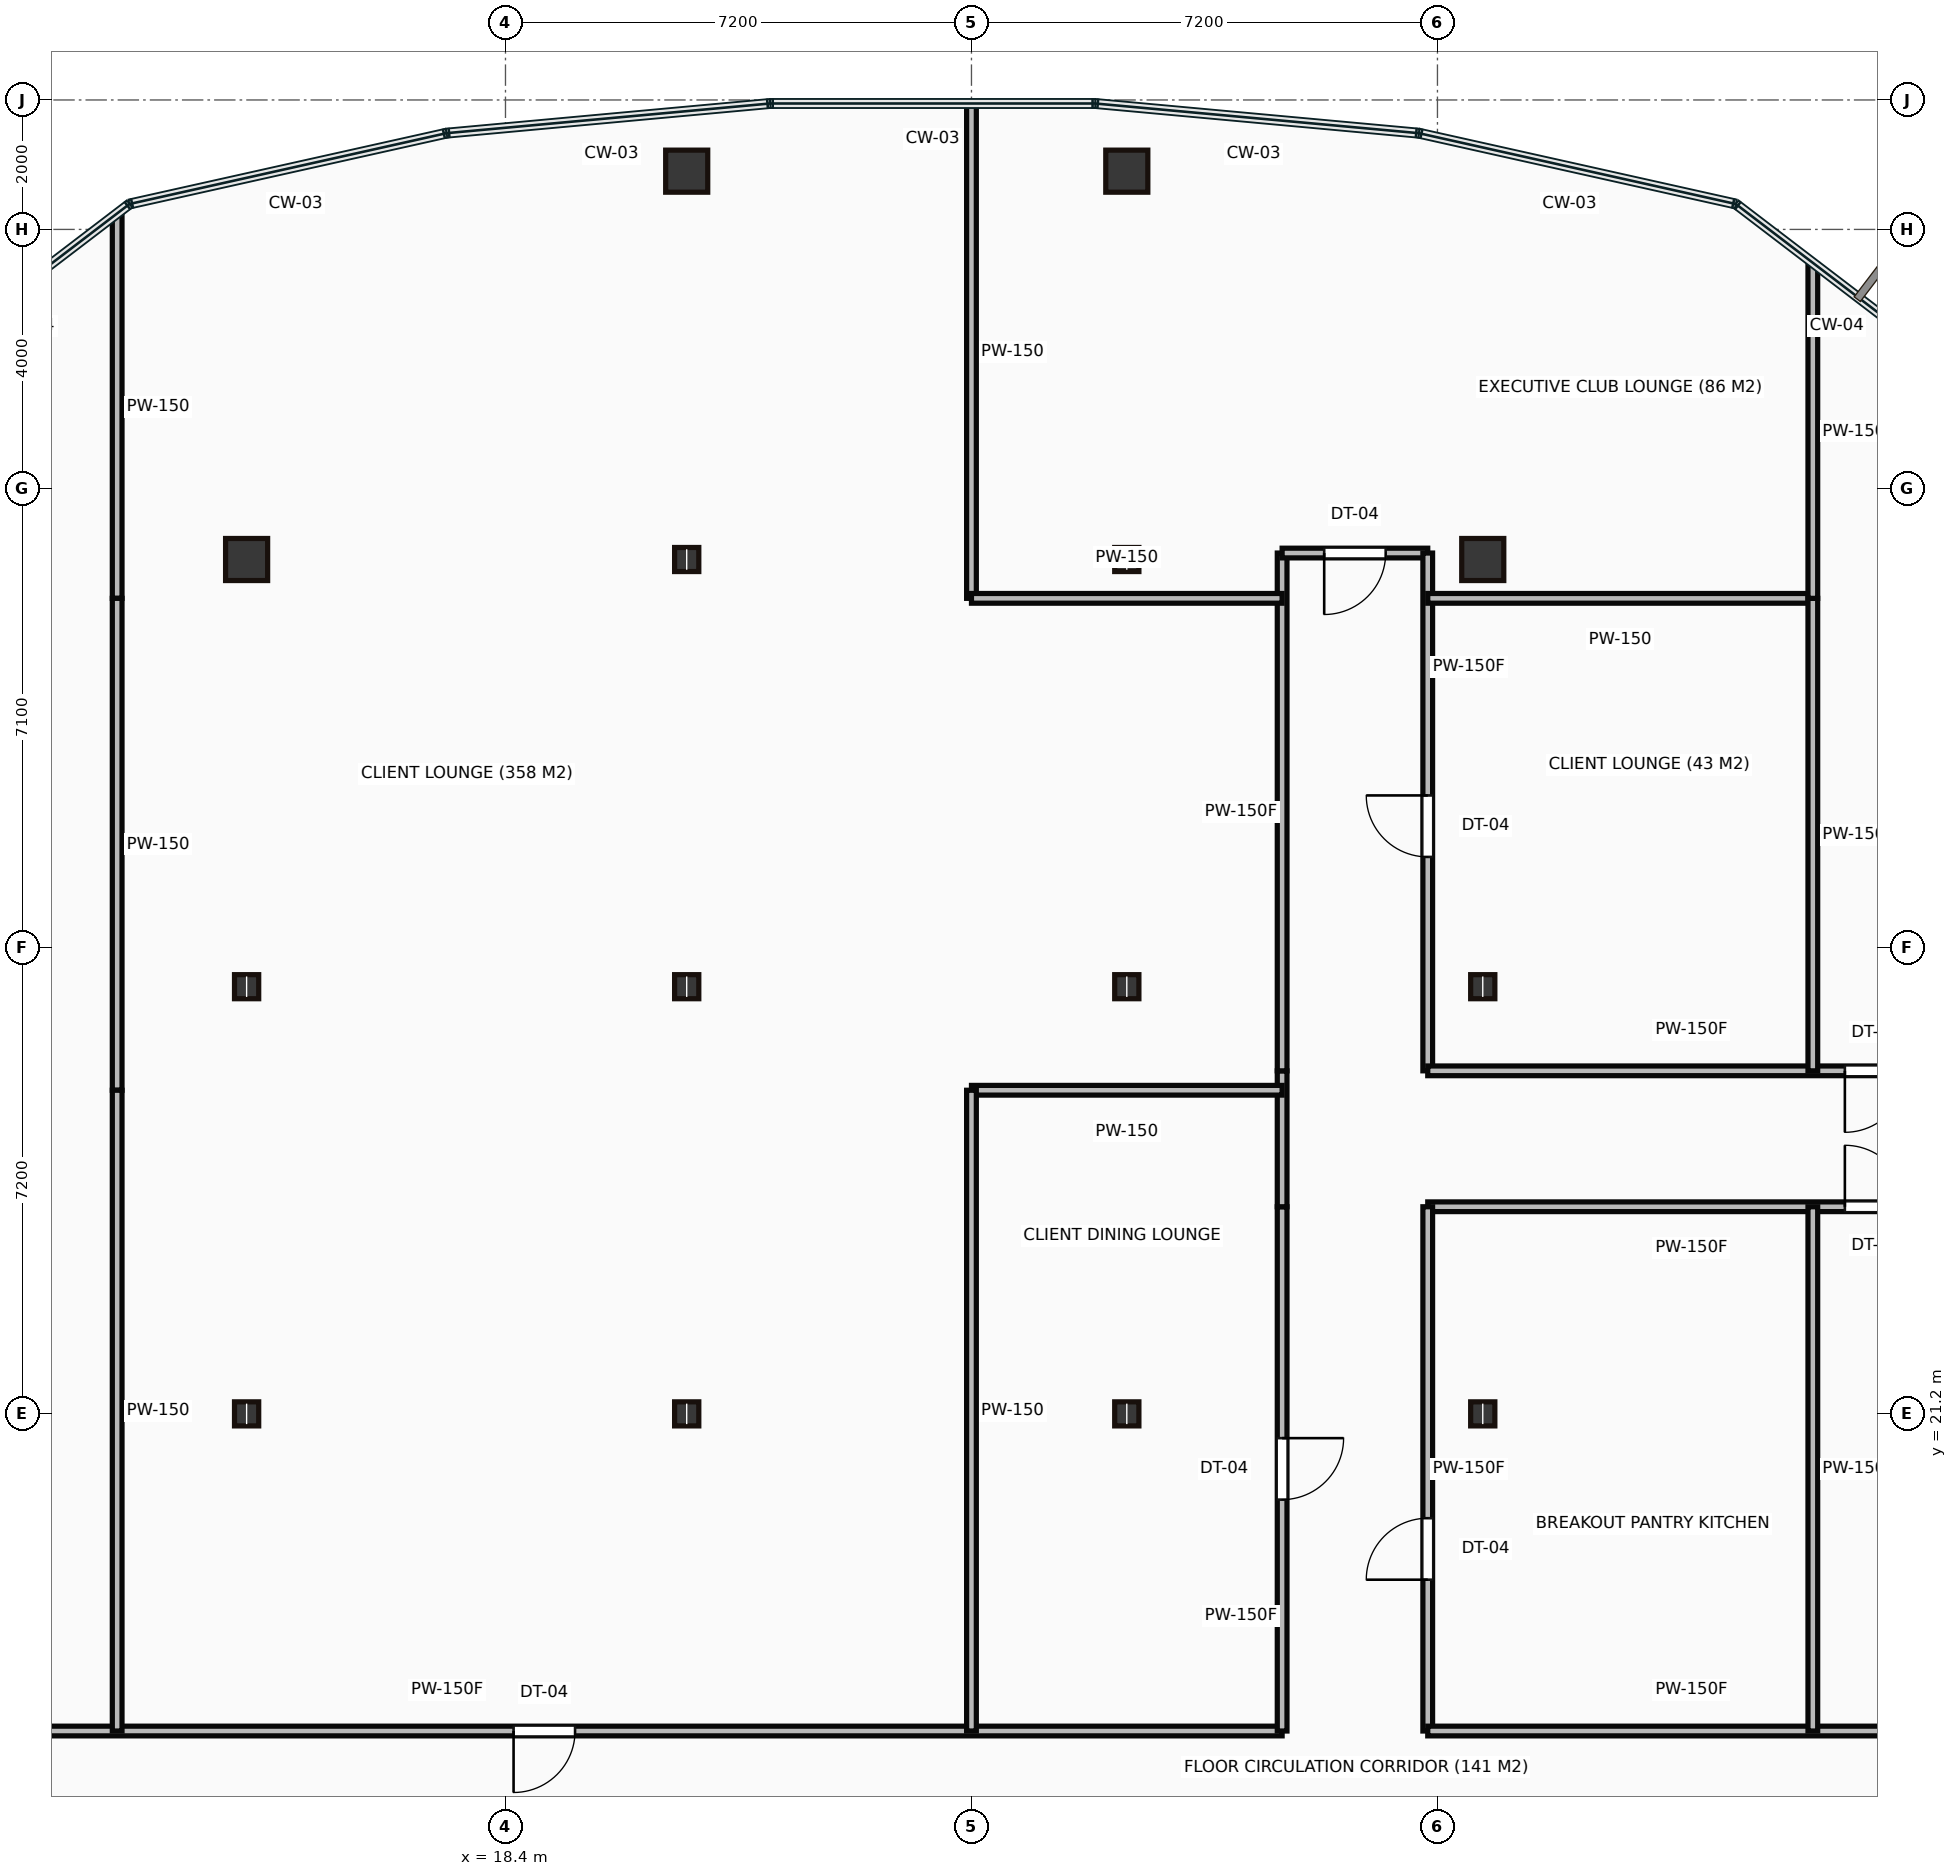
"""IFC4 building model, lengths in metres.
Left out: names, types, materials, properties, quantities, classifications, styles, units other than length and angle.
Written with IfcOpenShell. Run it as: python <this file> out.ifc"""

import sys

from ifc_helpers import new_model, si_unit, direction, frame, frame_2d, origin, origin_2d, place, context, subcontext, project, spatial, rectangle, hollow_rectangle, i_section, extrude, source, transform, mapped, element, fill, save


model = new_model("IFC4")
c1 = context("Model", 3, precision=1e-05, world=origin(), true_north=direction((0.0, 1.0)))
c2 = subcontext(c1, "Body", "Model", "MODEL_VIEW")
j1 = project(units=[si_unit("LENGTHUNIT", "METRE"), si_unit("PLANEANGLEUNIT", "RADIAN")], contexts=[c1])
p1 = place(None, origin())
s1 = spatial("IfcSite", under=j1, at=p1, CompositionType="ELEMENT")
p2 = place(p1, origin())
s2 = spatial("IfcBuilding", under=s1, at=p2, CompositionType="ELEMENT")
p3 = place(p2, frame((0.0, 0.0, 166.15)))
s3 = spatial("IfcBuildingStorey", under=s2, at=p3, CompositionType="ELEMENT", Elevation=166.15)
m1 = source(origin(), c2, "Body", "SweptSolid", [
    extrude(i_section(OverallWidth=0.374, OverallDepth=0.372, WebThickness=0.016, FlangeThickness=0.026, at=origin_2d()), origin(), (0.0, 0.0, 1.0), 3.65),
])
for number, where, z_axis, x_axis in (
    (1, (14.4, 21.2, 0.0), (0.0, 0.0, 1.0), (1.0, 0.0, 0.0)),
    (2, (14.4, 27.8, 0.0), (0.0, 0.0, 1.0), (1.0, 0.0, 0.0)),
):
    element("IfcColumn", number, at=place(p3, frame(where, z_axis=z_axis, x_axis=x_axis)), inside=s3, PredefinedType="COLUMN", context=c2, shape_type="MappedRepresentation", body=[
        mapped(m1, transform((0.0, 0.0, 0.0))),
    ])
m2 = source(origin(), c2, "Body", "SweptSolid", [
    extrude(hollow_rectangle(XDim=0.65, YDim=0.65, WallThickness=0.032, at=origin_2d()), origin(), (0.0, 0.0, 1.0), 3.65),
])
p4 = place(p3, frame((14.4, 34.4, 0.0), z_axis=(0.0, 0.0, 1.0), x_axis=(1.0, 0.0, 0.0)))
e3 = element("IfcColumn", 3, at=p4, inside=s3, PredefinedType="COLUMN", context=c2, shape_type="MappedRepresentation", body=[
    mapped(m2, transform((0.0, 0.0, 0.0))),
])
for number, where, z_axis, x_axis in (
    (4, (21.2, 21.2, 0.0), (0.0, 0.0, 1.0), (1.0, 0.0, 0.0)),
    (5, (21.2, 27.8, 0.0), (0.0, 0.0, 1.0), (1.0, 0.0, 0.0)),
    (6, (21.2, 34.4, 0.0), (0.0, 0.0, 1.0), (1.0, 0.0, 0.0)),
):
    element("IfcColumn", number, at=place(p3, frame(where, z_axis=z_axis, x_axis=x_axis)), inside=s3, PredefinedType="COLUMN", context=c2, shape_type="MappedRepresentation", body=[
        mapped(m1, transform((0.0, 0.0, 0.0))),
    ])
p5 = place(p3, frame((21.2, 40.4, 0.0), z_axis=(0.0, 0.0, 1.0), x_axis=(1.0, 0.0, 0.0)))
e7 = element("IfcColumn", 7, at=p5, inside=s3, PredefinedType="COLUMN", context=c2, shape_type="MappedRepresentation", body=[
    mapped(m2, transform((0.0, 0.0, 0.0))),
])
for number, where, z_axis, x_axis in (
    (8, (28.0, 21.2, 0.0), (0.0, 0.0, 1.0), (1.0, 0.0, 0.0)),
    (9, (28.0, 27.8, 0.0), (0.0, 0.0, 1.0), (1.0, 0.0, 0.0)),
    (10, (28.0, 34.4, 0.0), (0.0, 0.0, 1.0), (1.0, 0.0, 0.0)),
):
    element("IfcColumn", number, at=place(p3, frame(where, z_axis=z_axis, x_axis=x_axis)), inside=s3, PredefinedType="COLUMN", context=c2, shape_type="MappedRepresentation", body=[
        mapped(m1, transform((0.0, 0.0, 0.0))),
    ])
p6 = place(p3, frame((28.0, 40.4, 0.0), z_axis=(0.0, 0.0, 1.0), x_axis=(1.0, 0.0, 0.0)))
e11 = element("IfcColumn", 11, at=p6, inside=s3, PredefinedType="COLUMN", context=c2, shape_type="MappedRepresentation", body=[
    mapped(m2, transform((0.0, 0.0, 0.0))),
])
for number, where, z_axis, x_axis in (
    (12, (33.5, 21.2, 0.0), (0.0, 0.0, 1.0), (1.0, 0.0, 0.0)),
    (13, (33.5, 27.8, 0.0), (0.0, 0.0, 1.0), (1.0, 0.0, 0.0)),
):
    element("IfcColumn", number, at=place(p3, frame(where, z_axis=z_axis, x_axis=x_axis)), inside=s3, PredefinedType="COLUMN", context=c2, shape_type="MappedRepresentation", body=[
        mapped(m1, transform((0.0, 0.0, 0.0))),
    ])
p7 = place(p3, frame((33.5, 34.4, 0.0), z_axis=(0.0, 0.0, 1.0), x_axis=(1.0, 0.0, 0.0)))
e14 = element("IfcColumn", 14, at=p7, inside=s3, PredefinedType="COLUMN", context=c2, shape_type="MappedRepresentation", body=[
    mapped(m2, transform((0.0, 0.0, 0.0))),
])
m3 = source(origin(), c2, "Body", "SweptSolid", [
    extrude(rectangle(XDim=25.8, YDim=0.15, at=frame_2d((12.9, 0.0))), origin(), (0.0, 0.0, 1.0), 3.4),
])
p8 = place(p3, frame((4.6, 16.3, 0.0), z_axis=(0.0, 0.0, 1.0), x_axis=(1.0, 0.0, 0.0)))
e15 = element("IfcWall", 15, at=p8, inside=s3, PredefinedType="PARTITIONING", context=c2, shape_type="MappedRepresentation", body=[
    mapped(m3, transform((0.0, 0.0, 0.0))),
])
p9 = place(p8, frame((3.555, 0.0, 0.0)))
e16 = element("IfcOpeningElement", 16, at=p9, cuts=e15, PredefinedType="OPENING", context=c2, shape_type="SweptSolid", body=[
    extrude(rectangle(XDim=0.95, YDim=2.15, at=frame_2d((0.475, 1.075))), frame((0.0, 0.085, 0.0), z_axis=(0.0, -1.0, 0.0), x_axis=(1.0, 0.0, 0.0)), (0.0, 0.0, 1.0), 0.17),
])
p10 = place(p8, frame((13.925, 0.0, 0.0)))
e17 = element("IfcOpeningElement", 17, at=p10, cuts=e15, PredefinedType="OPENING", context=c2, shape_type="SweptSolid", body=[
    extrude(rectangle(XDim=0.95, YDim=2.15, at=frame_2d((0.475, 1.075))), frame((0.0, 0.085, 0.0), z_axis=(0.0, -1.0, 0.0), x_axis=(1.0, 0.0, 0.0)), (0.0, 0.0, 1.0), 0.17),
])
m4 = source(origin(), c2, "Body", "SweptSolid", [
    extrude(rectangle(XDim=8.1, YDim=0.15, at=frame_2d((4.05, 0.0))), origin(), (0.0, 0.0, 1.0), 3.4),
])
p11 = place(p3, frame((30.4, 16.3, 0.0), z_axis=(0.0, 0.0, 1.0), x_axis=(0.0, 1.0, 0.0)))
e18 = element("IfcWall", 18, at=p11, inside=s3, PredefinedType="PARTITIONING", context=c2, shape_type="MappedRepresentation", body=[
    mapped(m4, transform((0.0, 0.0, 0.0))),
])
p12 = place(p11, frame((3.575, 0.0, 0.0)))
e19 = element("IfcOpeningElement", 19, at=p12, cuts=e18, PredefinedType="OPENING", context=c2, shape_type="SweptSolid", body=[
    extrude(rectangle(XDim=0.95, YDim=2.15, at=frame_2d((0.475, 1.075))), frame((0.0, 0.085, 0.0), z_axis=(0.0, -1.0, 0.0), x_axis=(1.0, 0.0, 0.0)), (0.0, 0.0, 1.0), 0.17),
])
m5 = source(origin(), c2, "Body", "SweptSolid", [
    extrude(rectangle(XDim=2.1, YDim=0.15, at=frame_2d((1.05, 0.0))), origin(), (0.0, 0.0, 1.0), 3.4),
])
p13 = place(p3, frame((30.4, 24.4, 0.0), z_axis=(0.0, 0.0, 1.0), x_axis=(0.0, 1.0, 0.0)))
e20 = element("IfcWall", 20, at=p13, inside=s3, PredefinedType="PARTITIONING", context=c2, shape_type="MappedRepresentation", body=[
    mapped(m5, transform((0.0, 0.0, 0.0))),
])
m6 = source(origin(), c2, "Body", "SweptSolid", [
    extrude(rectangle(XDim=8.0, YDim=0.15, at=frame_2d((4.0, 0.0))), origin(), (0.0, 0.0, 1.0), 3.4),
])
p14 = place(p3, frame((30.4, 26.5, 0.0), z_axis=(0.0, 0.0, 1.0), x_axis=(0.0, 1.0, 0.0)))
e21 = element("IfcWall", 21, at=p14, inside=s3, PredefinedType="PARTITIONING", context=c2, shape_type="MappedRepresentation", body=[
    mapped(m6, transform((0.0, 0.0, 0.0))),
])
m7 = source(origin(), c2, "Body", "SweptSolid", [
    extrude(rectangle(XDim=2.25, YDim=0.15, at=frame_2d((1.125, 0.0))), origin(), (0.0, 0.0, 1.0), 2.76),
])
p15 = place(p3, frame((30.4, 34.5, 0.0), z_axis=(0.0, 0.0, 1.0), x_axis=(1.0, 0.0, 0.0)))
e22 = element("IfcWall", 22, at=p15, inside=s3, PredefinedType="PARTITIONING", context=c2, shape_type="MappedRepresentation", body=[
    mapped(m7, transform((0.0, 0.0, 0.0))),
])
p16 = place(p15, frame((0.65, 0.0, 0.0)))
e23 = element("IfcOpeningElement", 23, at=p16, cuts=e22, PredefinedType="OPENING", context=c2, shape_type="SweptSolid", body=[
    extrude(rectangle(XDim=0.95, YDim=2.15, at=frame_2d((0.475, 1.075))), frame((0.0, 0.085, 0.0), z_axis=(0.0, -1.0, 0.0), x_axis=(1.0, 0.0, 0.0)), (0.0, 0.0, 1.0), 0.17),
])
p17 = place(p3, frame((32.65, 34.5, 0.0), z_axis=(0.0, 0.0, 1.0), x_axis=(0.0, -1.0, 0.0)))
e24 = element("IfcWall", 24, at=p17, inside=s3, PredefinedType="PARTITIONING", context=c2, shape_type="MappedRepresentation", body=[
    mapped(m6, transform((0.0, 0.0, 0.0))),
])
p18 = place(p17, frame((3.745, 0.0, 0.0)))
e25 = element("IfcOpeningElement", 25, at=p18, cuts=e24, PredefinedType="OPENING", context=c2, shape_type="SweptSolid", body=[
    extrude(rectangle(XDim=0.95, YDim=2.15, at=frame_2d((0.475, 1.075))), frame((0.0, 0.085, 0.0), z_axis=(0.0, -1.0, 0.0), x_axis=(1.0, 0.0, 0.0)), (0.0, 0.0, 1.0), 0.17),
])
m8 = source(origin(), c2, "Body", "SweptSolid", [
    extrude(rectangle(XDim=8.15, YDim=0.15, at=frame_2d((4.075, 0.0))), origin(), (0.0, 0.0, 1.0), 3.4),
])
p19 = place(p3, frame((32.65, 26.5, 0.0), z_axis=(0.0, 0.0, 1.0), x_axis=(1.0, 0.0, 0.0)))
e26 = element("IfcWall", 26, at=p19, inside=s3, PredefinedType="PARTITIONING", context=c2, shape_type="MappedRepresentation", body=[
    mapped(m8, transform((0.0, 0.0, 0.0))),
])
p20 = place(p19, frame((6.445, 0.0, 0.0)))
e27 = element("IfcOpeningElement", 27, at=p20, cuts=e26, PredefinedType="OPENING", context=c2, shape_type="SweptSolid", body=[
    extrude(rectangle(XDim=0.95, YDim=2.15, at=frame_2d((0.475, 1.075))), frame((0.0, 0.085, 0.0), z_axis=(0.0, -1.0, 0.0), x_axis=(1.0, 0.0, 0.0)), (0.0, 0.0, 1.0), 0.17),
])
p21 = place(p3, frame((40.8, 24.4, 0.0), z_axis=(0.0, 0.0, 1.0), x_axis=(-1.0, 0.0, 0.0)))
e28 = element("IfcWall", 28, at=p21, inside=s3, PredefinedType="PARTITIONING", context=c2, shape_type="MappedRepresentation", body=[
    mapped(m8, transform((0.0, 0.0, 0.0))),
])
p22 = place(p21, frame((0.755, 0.0, 0.0)))
e29 = element("IfcOpeningElement", 29, at=p22, cuts=e28, PredefinedType="OPENING", context=c2, shape_type="SweptSolid", body=[
    extrude(rectangle(XDim=0.95, YDim=2.15, at=frame_2d((0.475, 1.075))), frame((0.0, 0.085, 0.0), z_axis=(0.0, -1.0, 0.0), x_axis=(1.0, 0.0, 0.0)), (0.0, 0.0, 1.0), 0.17),
])
p23 = place(p3, frame((32.65, 24.4, 0.0), z_axis=(0.0, 0.0, 1.0), x_axis=(0.0, -1.0, 0.0)))
e30 = element("IfcWall", 30, at=p23, inside=s3, PredefinedType="PARTITIONING", context=c2, shape_type="MappedRepresentation", body=[
    mapped(m4, transform((0.0, 0.0, 0.0))),
])
p24 = place(p23, frame((4.812, 0.0, 0.0)))
e31 = element("IfcOpeningElement", 31, at=p24, cuts=e30, PredefinedType="OPENING", context=c2, shape_type="SweptSolid", body=[
    extrude(rectangle(XDim=0.95, YDim=2.15, at=frame_2d((0.475, 1.075))), frame((0.0, 0.085, 0.0), z_axis=(0.0, -1.0, 0.0), x_axis=(1.0, 0.0, 0.0)), (0.0, 0.0, 1.0), 0.17),
])
p25 = place(p3, frame((32.65, 16.3, 0.0), z_axis=(0.0, 0.0, 1.0), x_axis=(1.0, 0.0, 0.0)))
e32 = element("IfcWall", 32, at=p25, inside=s3, PredefinedType="PARTITIONING", context=c2, shape_type="MappedRepresentation", body=[
    mapped(m8, transform((0.0, 0.0, 0.0))),
])
m9 = source(origin(), c2, "Body", "SweptSolid", [
    extrude(rectangle(XDim=5.922, YDim=0.15, at=frame_2d((2.961, 0.0))), origin(), (0.0, 0.0, 1.0), 3.4),
])
p26 = place(p3, frame((12.4, 39.722, 0.0), z_axis=(0.0, 0.0, 1.0), x_axis=(0.0, -1.0, 0.0)))
e33 = element("IfcWall", 33, at=p26, inside=s3, PredefinedType="PARTITIONING", context=c2, shape_type="MappedRepresentation", body=[
    mapped(m9, transform((0.0, 0.0, 0.0))),
])
m10 = source(origin(), c2, "Body", "SweptSolid", [
    extrude(rectangle(XDim=7.6, YDim=0.15, at=frame_2d((3.8, 0.0))), origin(), (0.0, 0.0, 1.0), 3.4),
])
p27 = place(p3, frame((12.4, 33.8, 0.0), z_axis=(0.0, 0.0, 1.0), x_axis=(0.0, -1.0, 0.0)))
e34 = element("IfcWall", 34, at=p27, inside=s3, PredefinedType="PARTITIONING", context=c2, shape_type="MappedRepresentation", body=[
    mapped(m10, transform((0.0, 0.0, 0.0))),
])
m11 = source(origin(), c2, "Body", "SweptSolid", [
    extrude(rectangle(XDim=9.9, YDim=0.15, at=frame_2d((4.95, 0.0))), origin(), (0.0, 0.0, 1.0), 3.4),
])
p28 = place(p3, frame((12.4, 26.2, 0.0), z_axis=(0.0, 0.0, 1.0), x_axis=(0.0, -1.0, 0.0)))
e35 = element("IfcWall", 35, at=p28, inside=s3, PredefinedType="PARTITIONING", context=c2, shape_type="MappedRepresentation", body=[
    mapped(m11, transform((0.0, 0.0, 0.0))),
])
m12 = source(origin(), c2, "Body", "SweptSolid", [
    extrude(rectangle(XDim=4.8, YDim=0.15, at=frame_2d((2.4, 0.0))), origin(), (0.0, 0.0, 1.0), 3.4),
])
p29 = place(p3, frame((30.4, 26.2, 0.0), z_axis=(0.0, 0.0, 1.0), x_axis=(-1.0, 0.0, 0.0)))
e36 = element("IfcWall", 36, at=p29, inside=s3, PredefinedType="PARTITIONING", context=c2, shape_type="MappedRepresentation", body=[
    mapped(m12, transform((0.0, 0.0, 0.0))),
])
p30 = place(p3, frame((25.6, 26.2, 0.0), z_axis=(0.0, 0.0, 1.0), x_axis=(0.0, -1.0, 0.0)))
e37 = element("IfcWall", 37, at=p30, inside=s3, PredefinedType="PARTITIONING", context=c2, shape_type="MappedRepresentation", body=[
    mapped(m11, transform((0.0, 0.0, 0.0))),
])
m13 = source(origin(), c2, "Body", "SweptSolid", [
    extrude(rectangle(XDim=7.625, YDim=0.15, at=frame_2d((3.813, 0.0))), origin(), (0.0, 0.0, 1.0), 3.4),
])
p31 = place(p3, frame((25.6, 41.426, 0.0), z_axis=(0.0, 0.0, 1.0), x_axis=(0.0, -1.0, 0.0)))
e38 = element("IfcWall", 38, at=p31, inside=s3, PredefinedType="PARTITIONING", context=c2, shape_type="MappedRepresentation", body=[
    mapped(m13, transform((0.0, 0.0, 0.0))),
])
p32 = place(p3, frame((25.6, 33.8, 0.0), z_axis=(0.0, 0.0, 1.0), x_axis=(1.0, 0.0, 0.0)))
e39 = element("IfcWall", 39, at=p32, inside=s3, PredefinedType="PARTITIONING", context=c2, shape_type="MappedRepresentation", body=[
    mapped(m12, transform((0.0, 0.0, 0.0))),
])
m14 = source(origin(), c2, "Body", "SweptSolid", [
    extrude(rectangle(XDim=5.95, YDim=0.15, at=frame_2d((2.975, 0.0))), origin(), (0.0, 0.0, 1.0), 3.4),
])
p33 = place(p3, frame((38.6, 33.8, 0.0), z_axis=(0.0, 0.0, 1.0), x_axis=(-1.0, 0.0, 0.0)))
e40 = element("IfcWall", 40, at=p33, inside=s3, PredefinedType="PARTITIONING", context=c2, shape_type="MappedRepresentation", body=[
    mapped(m14, transform((0.0, 0.0, 0.0))),
])
p34 = place(p3, frame((38.6, 24.4, 0.0), z_axis=(0.0, 0.0, 1.0), x_axis=(0.0, -1.0, 0.0)))
e41 = element("IfcWall", 41, at=p34, inside=s3, PredefinedType="PARTITIONING", context=c2, shape_type="MappedRepresentation", body=[
    mapped(m4, transform((0.0, 0.0, 0.0))),
])
m15 = source(origin(), c2, "Body", "SweptSolid", [
    extrude(rectangle(XDim=7.3, YDim=0.15, at=frame_2d((3.65, 0.0))), origin(), (0.0, 0.0, 1.0), 3.4),
])
p35 = place(p3, frame((38.6, 33.8, 0.0), z_axis=(0.0, 0.0, 1.0), x_axis=(0.0, -1.0, 0.0)))
e42 = element("IfcWall", 42, at=p35, inside=s3, PredefinedType="PARTITIONING", context=c2, shape_type="MappedRepresentation", body=[
    mapped(m15, transform((0.0, 0.0, 0.0))),
])
m16 = source(origin(), c2, "Body", "SweptSolid", [
    extrude(rectangle(XDim=5.159, YDim=0.15, at=frame_2d((2.58, 0.0))), origin(), (0.0, 0.0, 1.0), 3.4),
])
p36 = place(p3, frame((38.6, 38.959, 0.0), z_axis=(0.0, 0.0, 1.0), x_axis=(0.0, -1.0, 0.0)))
e43 = element("IfcWall", 43, at=p36, inside=s3, PredefinedType="PARTITIONING", context=c2, shape_type="MappedRepresentation", body=[
    mapped(m16, transform((0.0, 0.0, 0.0))),
])
m17 = source(origin(), c2, "Body", "SweptSolid", [
    extrude(rectangle(XDim=0.95, YDim=2.15, at=frame_2d((0.475, 1.075))), frame((0.0, 0.025, 0.0), z_axis=(0.0, -1.0, 0.0), x_axis=(1.0, 0.0, 0.0)), (0.0, 0.0, 1.0), 0.05),
])
p37 = place(p10, origin())
e44 = element("IfcDoor", 44, at=p37, inside=s3, OperationType="SINGLE_SWING_LEFT", PredefinedType="DOOR", context=c2, shape_type="MappedRepresentation", body=[
    mapped(m17, transform((0.0, 0.0, 0.0))),
])
fill(e17, e44)
p38 = place(p12, origin())
e45 = element("IfcDoor", 45, at=p38, inside=s3, OperationType="SINGLE_SWING_RIGHT", PredefinedType="DOOR", context=c2, shape_type="MappedRepresentation", body=[
    mapped(m17, transform((0.0, 0.0, 0.0))),
])
fill(e19, e45)
p39 = place(p16, origin())
e46 = element("IfcDoor", 46, at=p39, inside=s3, OperationType="SINGLE_SWING_LEFT", PredefinedType="DOOR", context=c2, shape_type="MappedRepresentation", body=[
    mapped(m17, transform((0.0, 0.0, 0.0))),
])
fill(e23, e46)
p40 = place(p24, origin())
e47 = element("IfcDoor", 47, at=p40, inside=s3, OperationType="SINGLE_SWING_RIGHT", PredefinedType="DOOR", context=c2, shape_type="MappedRepresentation", body=[
    mapped(m17, transform((0.0, 0.0, 0.0))),
])
fill(e31, e47)
p41 = place(p18, origin())
e48 = element("IfcDoor", 48, at=p41, inside=s3, OperationType="SINGLE_SWING_LEFT", PredefinedType="DOOR", context=c2, shape_type="MappedRepresentation", body=[
    mapped(m17, transform((0.0, 0.0, 0.0))),
])
fill(e25, e48)
p42 = place(p22, origin())
e49 = element("IfcDoor", 49, at=p42, inside=s3, OperationType="SINGLE_SWING_RIGHT", PredefinedType="DOOR", context=c2, shape_type="MappedRepresentation", body=[
    mapped(m17, transform((0.0, 0.0, 0.0))),
])
fill(e29, e49)
p43 = place(p20, origin())
e50 = element("IfcDoor", 50, at=p43, inside=s3, OperationType="SINGLE_SWING_LEFT", PredefinedType="DOOR", context=c2, shape_type="MappedRepresentation", body=[
    mapped(m17, transform((0.0, 0.0, 0.0))),
])
fill(e27, e50)
save(model, sys.argv[1])
